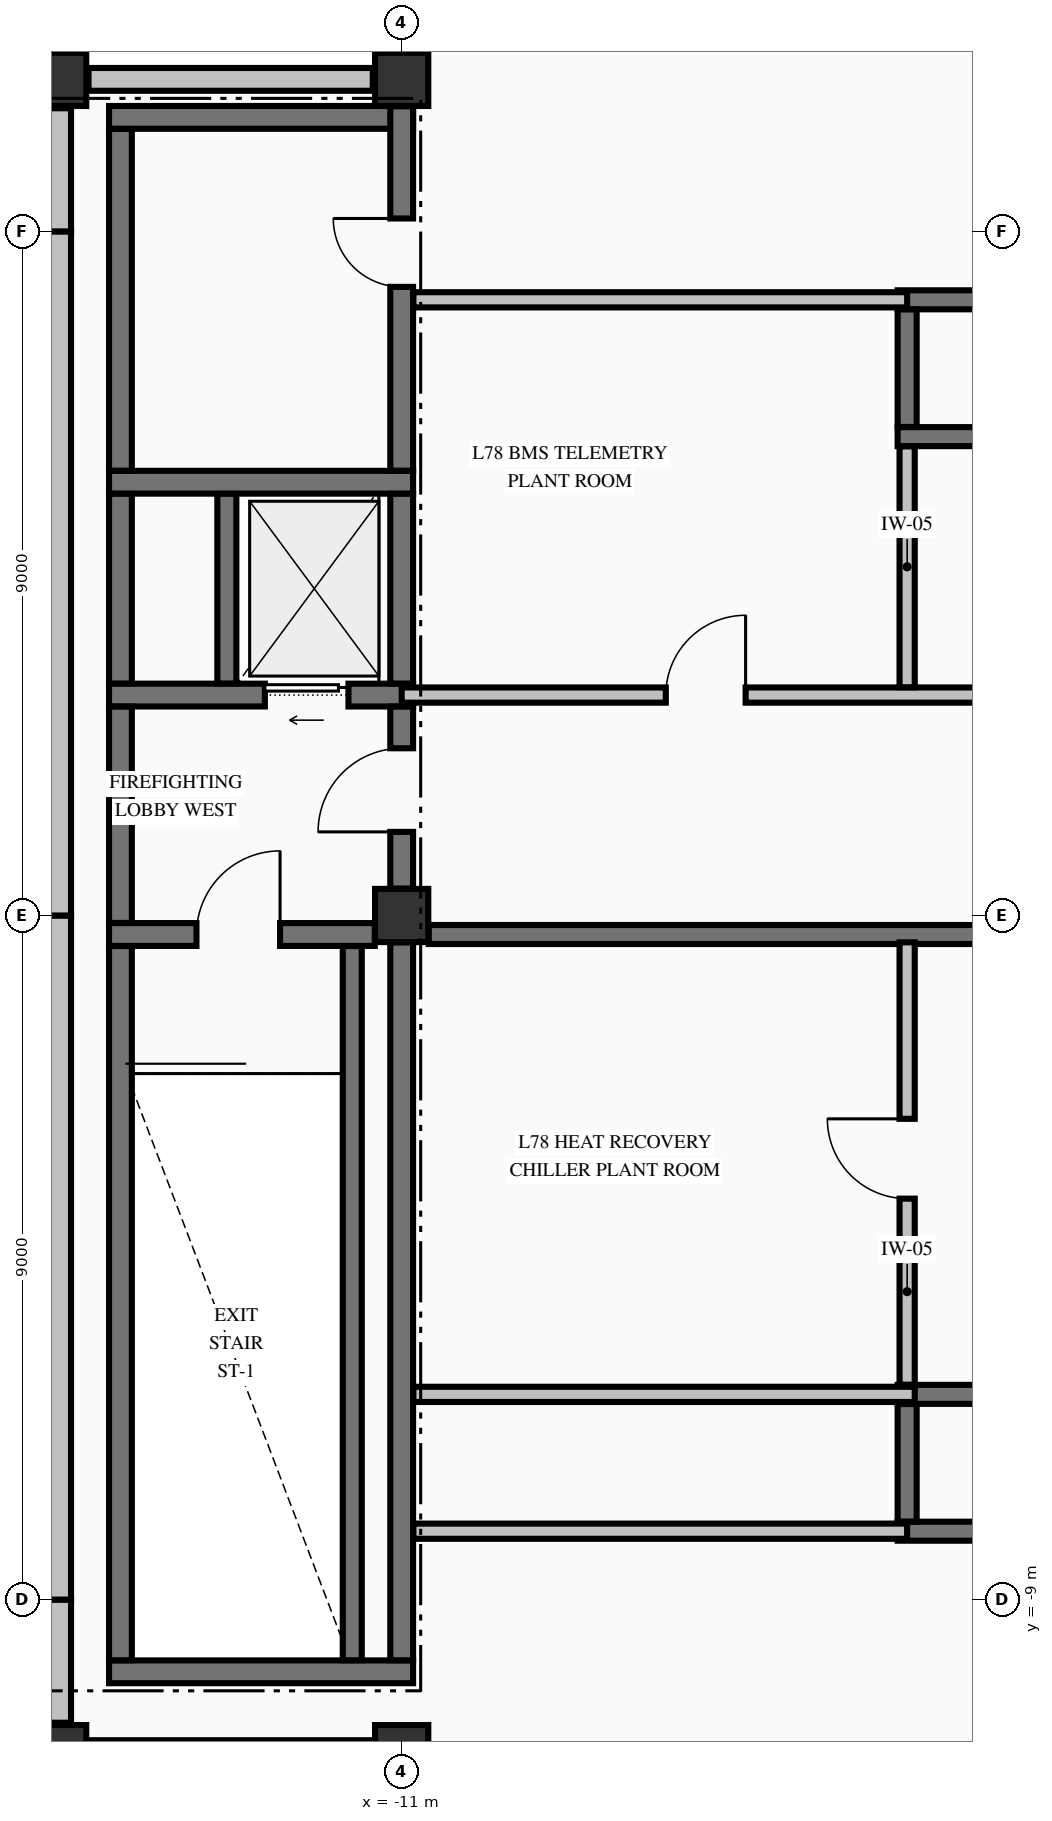
"""IFC4 building model, lengths in metres.
Left out: names, types, materials, properties, quantities, classifications, styles, units other than length and angle.
Written with IfcOpenShell. Run it as: python <this file> out.ifc"""

import sys

from ifc_helpers import new_model, si_unit, direction, frame, frame_2d, origin, origin_2d, place, context, subcontext, project, spatial, rectangle, extrude, element, fill, save


model = new_model("IFC4")
c1 = context("Model", 3, precision=1e-05, world=origin(), true_north=direction((0.0, 1.0)))
c2 = subcontext(c1, "Body", "Model", "MODEL_VIEW")
j1 = project(units=[si_unit("LENGTHUNIT", "METRE"), si_unit("PLANEANGLEUNIT", "RADIAN")], contexts=[c1])
p1 = place(None, origin())
s1 = spatial("IfcSite", under=j1, at=p1, CompositionType="ELEMENT")
p2 = place(p1, origin())
s2 = spatial("IfcBuilding", under=s1, at=p2, CompositionType="ELEMENT")
p3 = place(p2, frame((0.0, 0.0, 290.98)))
s3 = spatial("IfcBuildingStorey", under=s2, at=p3, CompositionType="ELEMENT", Elevation=290.98)
for number, where, z_axis, x_axis in (
    (1, (-15.5, 11.0, -0.325), (0.0, 0.0, 1.0), (1.0, 0.0, 0.0)),
    (2, (-15.5, -11.0, -0.325), (0.0, 0.0, 1.0), (1.0, 0.0, 0.0)),
    (3, (-11.0, -11.0, -0.325), (0.0, 0.0, 1.0), (1.0, 0.0, 0.0)),
    (4, (-11.0, 11.0, -0.325), (0.0, 0.0, 1.0), (1.0, 0.0, 0.0)),
    (5, (-11.0, 0.0, -0.325), (0.0, 0.0, 1.0), (1.0, 0.0, 0.0)),
):
    element("IfcColumn", number, at=place(p3, frame(where, z_axis=z_axis, x_axis=x_axis)), inside=s3, PredefinedType="COLUMN", context=c2, shape_type="SweptSolid", body=[
        extrude(rectangle(XDim=0.7, YDim=0.7, at=origin_2d()), origin(), (0.0, 0.0, 1.0), 3.06),
    ])
p4 = place(p3, frame((-15.5, -9.0, 0.0), z_axis=(0.0, 0.0, 1.0), x_axis=(0.0, -1.0, 0.0)))
e6 = element("IfcWall", 6, at=p4, inside=s3, PredefinedType="STANDARD", context=c2, shape_type="SweptSolid", body=[
    extrude(rectangle(XDim=1.62, YDim=0.3, at=frame_2d((0.81, 0.0))), origin(), (0.0, 0.0, 1.0), 2.127),
])
for number, where, z_axis, x_axis in (
    (7, (-15.5, 0.0, 0.0), (0.0, 0.0, 1.0), (0.0, -1.0, 0.0)),
    (8, (-15.5, 9.0, 0.0), (0.0, 0.0, 1.0), (0.0, -1.0, 0.0)),
):
    element("IfcWall", number, at=place(p3, frame(where, z_axis=z_axis, x_axis=x_axis)), inside=s3, PredefinedType="STANDARD", context=c2, shape_type="SweptSolid", body=[
        extrude(rectangle(XDim=9.0, YDim=0.3, at=frame_2d((4.5, 0.0))), origin(), (0.0, 0.0, 1.0), 2.127),
    ])
p5 = place(p3, frame((-15.5, 10.62, 0.0), z_axis=(0.0, 0.0, 1.0), x_axis=(0.0, -1.0, 0.0)))
e9 = element("IfcWall", 9, at=p5, inside=s3, PredefinedType="STANDARD", context=c2, shape_type="SweptSolid", body=[
    extrude(rectangle(XDim=1.62, YDim=0.3, at=frame_2d((0.81, 0.0))), origin(), (0.0, 0.0, 1.0), 2.127),
])
for number, where, z_axis, x_axis in (
    (10, (-11.38, 11.0, 0.0), (0.0, 0.0, 1.0), (-1.0, 0.0, 0.0)),
    (11, (-15.12, -11.0, 0.0), (0.0, 0.0, 1.0), (1.0, 0.0, 0.0)),
):
    element("IfcWall", number, at=place(p3, frame(where, z_axis=z_axis, x_axis=x_axis)), inside=s3, PredefinedType="STANDARD", context=c2, shape_type="SweptSolid", body=[
        extrude(rectangle(XDim=3.74, YDim=0.3, at=frame_2d((1.87, 0.0))), origin(), (0.0, 0.0, 1.0), 1.077),
    ])
p6 = place(p3, frame((-14.85, -9.95, 0.0), z_axis=(0.0, 0.0, 1.0), x_axis=(1.0, 0.0, 0.0)))
e12 = element("IfcWall", 12, at=p6, inside=s3, PredefinedType="SHEAR", context=c2, shape_type="SweptSolid", body=[
    extrude(rectangle(XDim=4.0, YDim=0.3, at=frame_2d((2.0, 0.0))), origin(), (0.0, 0.0, 1.0), 2.735),
])
p7 = place(p3, frame((-4.475, -8.1, 0.0), z_axis=(0.0, 0.0, 1.0), x_axis=(1.0, 0.0, 0.0)))
e13 = element("IfcWall", 13, at=p7, inside=s3, PredefinedType="SOLIDWALL", context=c2, shape_type="SweptSolid", body=[
    extrude(rectangle(XDim=8.75, YDim=0.25, at=frame_2d((4.375, 0.0))), origin(), (0.0, 0.0, 1.0), 2.735),
])
p8 = place(p3, frame((-4.475, -6.3, 0.0), z_axis=(0.0, 0.0, 1.0), x_axis=(1.0, 0.0, 0.0)))
e14 = element("IfcWall", 14, at=p8, inside=s3, PredefinedType="SOLIDWALL", context=c2, shape_type="SweptSolid", body=[
    extrude(rectangle(XDim=8.75, YDim=0.25, at=frame_2d((4.375, 0.0))), origin(), (0.0, 0.0, 1.0), 2.735),
])
p9 = place(p8, frame((7.05, 0.0, 0.0)))
e15 = element("IfcOpeningElement", 15, at=p9, cuts=e14, PredefinedType="OPENING", context=c2, shape_type="SweptSolid", body=[
    extrude(rectangle(XDim=1.05, YDim=2.15, at=frame_2d((0.525, 1.075))), frame((0.0, 0.135, 0.0), z_axis=(0.0, -1.0, 0.0), x_axis=(1.0, 0.0, 0.0)), (0.0, 0.0, 1.0), 0.27),
])
p10 = place(p3, frame((-14.85, -0.25, 0.0), z_axis=(0.0, 0.0, 1.0), x_axis=(1.0, 0.0, 0.0)))
e16 = element("IfcWall", 16, at=p10, inside=s3, PredefinedType="SHEAR", context=c2, shape_type="SweptSolid", body=[
    extrude(rectangle(XDim=3.496, YDim=0.3, at=frame_2d((1.748, 0.0))), origin(), (0.0, 0.0, 1.0), 2.735),
])
p11 = place(p10, frame((1.15, 0.0, 0.0)))
e17 = element("IfcOpeningElement", 17, at=p11, cuts=e16, PredefinedType="OPENING", context=c2, shape_type="SweptSolid", body=[
    extrude(rectangle(XDim=1.1, YDim=2.15, at=frame_2d((0.55, 1.075))), frame((0.0, 0.16, 0.0), z_axis=(0.0, -1.0, 0.0), x_axis=(1.0, 0.0, 0.0)), (0.0, 0.0, 1.0), 0.32),
])
p12 = place(p3, frame((-14.85, 2.9, 0.0), z_axis=(0.0, 0.0, 1.0), x_axis=(1.0, 0.0, 0.0)))
e18 = element("IfcWall", 18, at=p12, inside=s3, PredefinedType="SHEAR", context=c2, shape_type="SweptSolid", body=[
    extrude(rectangle(XDim=4.0, YDim=0.3, at=frame_2d((2.0, 0.0))), origin(), (0.0, 0.0, 1.0), 2.735),
])
p13 = place(p12, frame((2.05, 0.0, 0.0)))
e19 = element("IfcOpeningElement", 19, at=p13, cuts=e18, PredefinedType="OPENING", context=c2, shape_type="SweptSolid", body=[
    extrude(rectangle(XDim=1.1, YDim=2.2, at=frame_2d((0.55, 1.1))), frame((0.0, 0.16, 0.0), z_axis=(0.0, -1.0, 0.0), x_axis=(1.0, 0.0, 0.0)), (0.0, 0.0, 1.0), 0.32),
])
p14 = place(p3, frame((-14.85, 5.7, 0.0), z_axis=(0.0, 0.0, 1.0), x_axis=(1.0, 0.0, 0.0)))
e20 = element("IfcWall", 20, at=p14, inside=s3, PredefinedType="SHEAR", context=c2, shape_type="SweptSolid", body=[
    extrude(rectangle(XDim=4.0, YDim=0.3, at=frame_2d((2.0, 0.0))), origin(), (0.0, 0.0, 1.0), 2.735),
])
p15 = place(p3, frame((-4.475, 6.3, 0.0), z_axis=(0.0, 0.0, 1.0), x_axis=(1.0, 0.0, 0.0)))
e21 = element("IfcWall", 21, at=p15, inside=s3, PredefinedType="SOLIDWALL", context=c2, shape_type="SweptSolid", body=[
    extrude(rectangle(XDim=8.75, YDim=0.25, at=frame_2d((4.375, 0.0))), origin(), (0.0, 0.0, 1.0), 2.735),
])
p16 = place(p15, frame((7.05, 0.0, 0.0)))
e22 = element("IfcOpeningElement", 22, at=p16, cuts=e21, PredefinedType="OPENING", context=c2, shape_type="SweptSolid", body=[
    extrude(rectangle(XDim=1.05, YDim=2.15, at=frame_2d((0.525, 1.075))), frame((0.0, 0.135, 0.0), z_axis=(0.0, -1.0, 0.0), x_axis=(1.0, 0.0, 0.0)), (0.0, 0.0, 1.0), 0.27),
])
p17 = place(p3, frame((-4.475, 8.1, 0.0), z_axis=(0.0, 0.0, 1.0), x_axis=(1.0, 0.0, 0.0)))
e23 = element("IfcWall", 23, at=p17, inside=s3, PredefinedType="SOLIDWALL", context=c2, shape_type="SweptSolid", body=[
    extrude(rectangle(XDim=8.75, YDim=0.25, at=frame_2d((4.375, 0.0))), origin(), (0.0, 0.0, 1.0), 2.735),
])
p18 = place(p3, frame((-14.85, 10.5, 0.0), z_axis=(0.0, 0.0, 1.0), x_axis=(1.0, 0.0, 0.0)))
e24 = element("IfcWall", 24, at=p18, inside=s3, PredefinedType="SHEAR", context=c2, shape_type="SweptSolid", body=[
    extrude(rectangle(XDim=4.0, YDim=0.3, at=frame_2d((2.0, 0.0))), origin(), (0.0, 0.0, 1.0), 2.735),
])
p19 = place(p3, frame((-10.847, -8.1, 0.0), z_axis=(0.0, 0.0, 1.0), x_axis=(1.0, 0.0, 0.0)))
e25 = element("IfcWall", 25, at=p19, inside=s3, PredefinedType="PARTITIONING", context=c2, shape_type="SweptSolid", body=[
    extrude(rectangle(XDim=6.497, YDim=0.2, at=frame_2d((3.249, 0.0))), origin(), (0.0, 0.0, 1.0), 2.735),
])
p20 = place(p3, frame((-10.847, -6.3, 0.0), z_axis=(0.0, 0.0, 1.0), x_axis=(1.0, 0.0, 0.0)))
e26 = element("IfcWall", 26, at=p20, inside=s3, PredefinedType="PARTITIONING", context=c2, shape_type="SweptSolid", body=[
    extrude(rectangle(XDim=6.597, YDim=0.2, at=frame_2d((3.298, 0.0))), origin(), (0.0, 0.0, 1.0), 2.735),
])
p21 = place(p3, frame((-10.644, -0.25, 0.0), z_axis=(0.0, 0.0, 1.0), x_axis=(1.0, 0.0, 0.0)))
e27 = element("IfcWall", 27, at=p21, inside=s3, PredefinedType="SOLIDWALL", context=c2, shape_type="SweptSolid", body=[
    extrude(rectangle(XDim=21.288, YDim=0.25, at=frame_2d((10.644, 0.0))), origin(), (0.0, 0.0, 1.0), 2.735),
])
p22 = place(p21, frame((7.594, 0.0, 0.0)))
e28 = element("IfcOpeningElement", 28, at=p22, cuts=e27, PredefinedType="OPENING", context=c2, shape_type="SweptSolid", body=[
    extrude(rectangle(XDim=0.95, YDim=2.02, at=frame_2d((0.475, 1.01))), frame((0.0, 0.135, 0.0), z_axis=(0.0, -1.0, 0.0), x_axis=(1.0, 0.0, 0.0)), (0.0, 0.0, 1.0), 0.27),
])
p23 = place(p3, frame((-11.0, 2.9, 0.0), z_axis=(0.0, 0.0, 1.0), x_axis=(1.0, 0.0, 0.0)))
e29 = element("IfcWall", 29, at=p23, inside=s3, PredefinedType="PARTITIONING", context=c2, shape_type="SweptSolid", body=[
    extrude(rectangle(XDim=22.0, YDim=0.2, at=frame_2d((11.0, 0.0))), origin(), (0.0, 0.0, 1.0), 2.735),
])
p24 = place(p23, frame((7.95, 0.0, 0.0)))
e30 = element("IfcOpeningElement", 30, at=p24, cuts=e29, PredefinedType="OPENING", context=c2, shape_type="SweptSolid", body=[
    extrude(rectangle(XDim=1.1, YDim=2.15, at=frame_2d((0.55, 1.075))), frame((0.0, 0.11, 0.0), z_axis=(0.0, -1.0, 0.0), x_axis=(1.0, 0.0, 0.0)), (0.0, 0.0, 1.0), 0.22),
])
p25 = place(p23, frame((17.475, 0.0, 0.0)))
e31 = element("IfcOpeningElement", 31, at=p25, cuts=e29, PredefinedType="OPENING", context=c2, shape_type="SweptSolid", body=[
    extrude(rectangle(XDim=1.05, YDim=2.15, at=frame_2d((0.525, 1.075))), frame((0.0, 0.11, 0.0), z_axis=(0.0, -1.0, 0.0), x_axis=(1.0, 0.0, 0.0)), (0.0, 0.0, 1.0), 0.22),
])
p26 = place(p23, frame((3.475, 0.0, 0.0)))
e32 = element("IfcOpeningElement", 32, at=p26, cuts=e29, PredefinedType="OPENING", context=c2, shape_type="SweptSolid", body=[
    extrude(rectangle(XDim=1.05, YDim=2.15, at=frame_2d((0.525, 1.075))), frame((0.0, 0.11, 0.0), z_axis=(0.0, -1.0, 0.0), x_axis=(1.0, 0.0, 0.0)), (0.0, 0.0, 1.0), 0.22),
])
p27 = place(p3, frame((-10.847, 8.1, 0.0), z_axis=(0.0, 0.0, 1.0), x_axis=(1.0, 0.0, 0.0)))
e33 = element("IfcWall", 33, at=p27, inside=s3, PredefinedType="PARTITIONING", context=c2, shape_type="SweptSolid", body=[
    extrude(rectangle(XDim=6.497, YDim=0.2, at=frame_2d((3.249, 0.0))), origin(), (0.0, 0.0, 1.0), 2.735),
])
p28 = place(p3, frame((-14.7, -9.798, 0.0), z_axis=(0.0, 0.0, 1.0), x_axis=(0.0, 1.0, 0.0)))
e34 = element("IfcWall", 34, at=p28, inside=s3, PredefinedType="SHEAR", context=c2, shape_type="SweptSolid", body=[
    extrude(rectangle(XDim=9.396, YDim=0.3, at=frame_2d((4.698, 0.0))), origin(), (0.0, 0.0, 1.0), 2.735),
])
p29 = place(p3, frame((-14.7, -0.098, 0.0), z_axis=(0.0, 0.0, 1.0), x_axis=(0.0, 1.0, 0.0)))
e35 = element("IfcWall", 35, at=p29, inside=s3, PredefinedType="SHEAR", context=c2, shape_type="SweptSolid", body=[
    extrude(rectangle(XDim=2.846, YDim=0.3, at=frame_2d((1.423, 0.0))), origin(), (0.0, 0.0, 1.0), 2.735),
])
p30 = place(p3, frame((-14.7, 3.052, 0.0), z_axis=(0.0, 0.0, 1.0), x_axis=(0.0, 1.0, 0.0)))
e36 = element("IfcWall", 36, at=p30, inside=s3, PredefinedType="SHEAR", context=c2, shape_type="SweptSolid", body=[
    extrude(rectangle(XDim=2.496, YDim=0.3, at=frame_2d((1.248, 0.0))), origin(), (0.0, 0.0, 1.0), 2.735),
])
p31 = place(p3, frame((-14.7, 5.852, 0.0), z_axis=(0.0, 0.0, 1.0), x_axis=(0.0, 1.0, 0.0)))
e37 = element("IfcWall", 37, at=p31, inside=s3, PredefinedType="SHEAR", context=c2, shape_type="SweptSolid", body=[
    extrude(rectangle(XDim=4.496, YDim=0.3, at=frame_2d((2.248, 0.0))), origin(), (0.0, 0.0, 1.0), 2.735),
])
p32 = place(p3, frame((-13.3, 3.052, 0.0), z_axis=(0.0, 0.0, 1.0), x_axis=(0.0, 1.0, 0.0)))
e38 = element("IfcWall", 38, at=p32, inside=s3, PredefinedType="SOLIDWALL", context=c2, shape_type="SweptSolid", body=[
    extrude(rectangle(XDim=2.496, YDim=0.25, at=frame_2d((1.248, 0.0))), origin(), (0.0, 0.0, 1.0), 2.735),
])
p33 = place(p3, frame((-11.65, -9.798, 0.0), z_axis=(0.0, 0.0, 1.0), x_axis=(0.0, 1.0, 0.0)))
e39 = element("IfcWall", 39, at=p33, inside=s3, PredefinedType="SOLIDWALL", context=c2, shape_type="SweptSolid", body=[
    extrude(rectangle(XDim=9.396, YDim=0.25, at=frame_2d((4.698, 0.0))), origin(), (0.0, 0.0, 1.0), 2.735),
])
p34 = place(p3, frame((-11.0, -9.798, 0.0), z_axis=(0.0, 0.0, 1.0), x_axis=(0.0, 1.0, 0.0)))
e40 = element("IfcWall", 40, at=p34, inside=s3, PredefinedType="SHEAR", context=c2, shape_type="SweptSolid", body=[
    extrude(rectangle(XDim=9.444, YDim=0.3, at=frame_2d((4.722, 0.0))), origin(), (0.0, 0.0, 1.0), 2.735),
])
p35 = place(p3, frame((-11.0, 0.354, 0.0), z_axis=(0.0, 0.0, 1.0), x_axis=(0.0, 1.0, 0.0)))
e41 = element("IfcWall", 41, at=p35, inside=s3, PredefinedType="SHEAR", context=c2, shape_type="SweptSolid", body=[
    extrude(rectangle(XDim=2.394, YDim=0.3, at=frame_2d((1.197, 0.0))), origin(), (0.0, 0.0, 1.0), 2.735),
])
p36 = place(p35, frame((0.746, 0.0, 0.0)))
e42 = element("IfcOpeningElement", 42, at=p36, cuts=e41, PredefinedType="OPENING", context=c2, shape_type="SweptSolid", body=[
    extrude(rectangle(XDim=1.1, YDim=2.15, at=frame_2d((0.55, 1.075))), frame((0.0, 0.16, 0.0), z_axis=(0.0, -1.0, 0.0), x_axis=(1.0, 0.0, 0.0)), (0.0, 0.0, 1.0), 0.32),
])
p37 = place(p3, frame((-11.0, 3.052, 0.0), z_axis=(0.0, 0.0, 1.0), x_axis=(0.0, 1.0, 0.0)))
e43 = element("IfcWall", 43, at=p37, inside=s3, PredefinedType="SHEAR", context=c2, shape_type="SweptSolid", body=[
    extrude(rectangle(XDim=2.496, YDim=0.3, at=frame_2d((1.248, 0.0))), origin(), (0.0, 0.0, 1.0), 2.735),
])
p38 = place(p3, frame((-11.0, 5.852, 0.0), z_axis=(0.0, 0.0, 1.0), x_axis=(0.0, 1.0, 0.0)))
e44 = element("IfcWall", 44, at=p38, inside=s3, PredefinedType="SHEAR", context=c2, shape_type="SweptSolid", body=[
    extrude(rectangle(XDim=4.794, YDim=0.3, at=frame_2d((2.397, 0.0))), origin(), (0.0, 0.0, 1.0), 2.735),
])
p39 = place(p38, frame((2.418, 0.0, 0.0)))
e45 = element("IfcOpeningElement", 45, at=p39, cuts=e44, PredefinedType="OPENING", context=c2, shape_type="SweptSolid", body=[
    extrude(rectangle(XDim=0.9, YDim=2.15, at=frame_2d((0.45, 1.075))), frame((0.0, 0.16, 0.0), z_axis=(0.0, -1.0, 0.0), x_axis=(1.0, 0.0, 0.0)), (0.0, 0.0, 1.0), 0.32),
])
for number, where, z_axis, x_axis in (
    (46, (-4.35, -7.973, 0.0), (0.0, 0.0, 1.0), (0.0, 1.0, 0.0)),
    (47, (-4.35, 6.427, 0.0), (0.0, 0.0, 1.0), (0.0, 1.0, 0.0)),
):
    element("IfcWall", number, at=place(p3, frame(where, z_axis=z_axis, x_axis=x_axis)), inside=s3, PredefinedType="SOLIDWALL", context=c2, shape_type="SweptSolid", body=[
        extrude(rectangle(XDim=1.546, YDim=0.25, at=frame_2d((0.773, 0.0))), origin(), (0.0, 0.0, 1.0), 2.735),
    ])
p40 = place(p3, frame((-4.35, -6.172, 0.0), z_axis=(0.0, 0.0, 1.0), x_axis=(0.0, 1.0, 0.0)))
e48 = element("IfcWall", 48, at=p40, inside=s3, PredefinedType="PARTITIONING", context=c2, shape_type="SweptSolid", body=[
    extrude(rectangle(XDim=5.819, YDim=0.2, at=frame_2d((2.91, 0.0))), origin(), (0.0, 0.0, 1.0), 2.735),
])
p41 = place(p40, frame((2.447, 0.0, 0.0)))
e49 = element("IfcOpeningElement", 49, at=p41, cuts=e48, PredefinedType="OPENING", context=c2, shape_type="SweptSolid", body=[
    extrude(rectangle(XDim=1.05, YDim=2.15, at=frame_2d((0.525, 1.075))), frame((0.0, 0.11, 0.0), z_axis=(0.0, -1.0, 0.0), x_axis=(1.0, 0.0, 0.0)), (0.0, 0.0, 1.0), 0.22),
])
p42 = place(p3, frame((-4.35, 3.003, 0.0), z_axis=(0.0, 0.0, 1.0), x_axis=(0.0, 1.0, 0.0)))
e50 = element("IfcWall", 50, at=p42, inside=s3, PredefinedType="PARTITIONING", context=c2, shape_type="SweptSolid", body=[
    extrude(rectangle(XDim=3.169, YDim=0.2, at=frame_2d((1.584, 0.0))), origin(), (0.0, 0.0, 1.0), 2.735),
])
p43 = place(p11, origin())
e51 = element("IfcDoor", 51, at=p43, inside=s3, OperationType="SINGLE_SWING_RIGHT", PredefinedType="DOOR", context=c2, shape_type="SweptSolid", body=[
    extrude(rectangle(XDim=1.1, YDim=2.15, at=frame_2d((0.55, 1.075))), frame((0.0, 0.025, 0.0), z_axis=(0.0, -1.0, 0.0), x_axis=(1.0, 0.0, 0.0)), (0.0, 0.0, 1.0), 0.05),
])
fill(e17, e51)
p44 = place(p36, origin())
e52 = element("IfcDoor", 52, at=p44, inside=s3, OperationType="SINGLE_SWING_LEFT", PredefinedType="DOOR", context=c2, shape_type="SweptSolid", body=[
    extrude(rectangle(XDim=1.1, YDim=2.15, at=frame_2d((0.55, 1.075))), frame((0.0, 0.025, 0.0), z_axis=(0.0, -1.0, 0.0), x_axis=(1.0, 0.0, 0.0)), (0.0, 0.0, 1.0), 0.05),
])
fill(e42, e52)
p45 = place(p13, origin())
e53 = element("IfcDoor", 53, at=p45, inside=s3, OperationType="SLIDING_TO_LEFT", PredefinedType="DOOR", context=c2, shape_type="SweptSolid", body=[
    extrude(rectangle(XDim=1.1, YDim=2.2, at=frame_2d((0.55, 1.1))), frame((0.0, 0.025, 0.0), z_axis=(0.0, -1.0, 0.0), x_axis=(1.0, 0.0, 0.0)), (0.0, 0.0, 1.0), 0.05),
])
fill(e19, e53)
p46 = place(p39, origin())
e54 = element("IfcDoor", 54, at=p46, inside=s3, OperationType="SINGLE_SWING_RIGHT", PredefinedType="DOOR", context=c2, shape_type="SweptSolid", body=[
    extrude(rectangle(XDim=0.9, YDim=2.15, at=frame_2d((0.45, 1.075))), frame((0.0, 0.025, 0.0), z_axis=(0.0, -1.0, 0.0), x_axis=(1.0, 0.0, 0.0)), (0.0, 0.0, 1.0), 0.05),
])
fill(e45, e54)
p47 = place(p41, origin())
e55 = element("IfcDoor", 55, at=p47, inside=s3, OperationType="SINGLE_SWING_RIGHT", PredefinedType="DOOR", context=c2, shape_type="SweptSolid", body=[
    extrude(rectangle(XDim=1.05, YDim=2.15, at=frame_2d((0.525, 1.075))), frame((0.0, 0.025, 0.0), z_axis=(0.0, -1.0, 0.0), x_axis=(1.0, 0.0, 0.0)), (0.0, 0.0, 1.0), 0.05),
])
fill(e49, e55)
p48 = place(p26, origin())
e56 = element("IfcDoor", 56, at=p48, inside=s3, OperationType="SINGLE_SWING_RIGHT", PredefinedType="DOOR", context=c2, shape_type="SweptSolid", body=[
    extrude(rectangle(XDim=1.05, YDim=2.15, at=frame_2d((0.525, 1.075))), frame((0.0, 0.025, 0.0), z_axis=(0.0, -1.0, 0.0), x_axis=(1.0, 0.0, 0.0)), (0.0, 0.0, 1.0), 0.05),
])
fill(e32, e56)
save(model, sys.argv[1])
